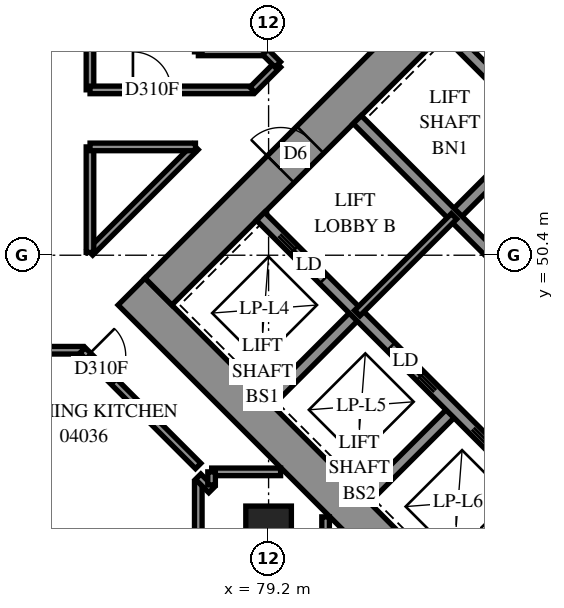
"""IFC4 building model, lengths in metres.
Left out: names, types, materials, properties, quantities, classifications, styles, units other than length and angle.
Written with IfcOpenShell. Run it as: python <this file> out.ifc"""

import sys

from ifc_helpers import new_model, si_unit, direction, frame, frame_2d, origin, origin_2d, place, context, subcontext, project, spatial, polyline, rectangle, outline, extrude, element, fill, save


model = new_model("IFC4")
c1 = context("Model", 3, precision=1e-05, world=origin(), true_north=direction((0.0, 1.0)))
c2 = subcontext(c1, "Body", "Model", "MODEL_VIEW")
j1 = project(units=[si_unit("LENGTHUNIT", "METRE"), si_unit("PLANEANGLEUNIT", "RADIAN")], contexts=[c1])
p1 = place(None, origin())
s1 = spatial("IfcSite", under=j1, at=p1, CompositionType="ELEMENT")
p2 = place(p1, origin())
s2 = spatial("IfcBuilding", under=s1, at=p2, CompositionType="ELEMENT")
p3 = place(p2, frame((0.0, 0.0, 18.6)))
s3 = spatial("IfcBuildingStorey", under=s2, at=p3, CompositionType="ELEMENT", Elevation=18.6)
p4 = place(p3, frame((79.2, 43.2, 0.0), z_axis=(0.0, 0.0, 1.0), x_axis=(1.0, 0.0, 0.0)))
e1 = element("IfcColumn", 1, at=p4, inside=s3, PredefinedType="COLUMN", context=c2, shape_type="SweptSolid", body=[
    extrude(rectangle(XDim=1.2, YDim=1.2, at=origin_2d()), origin(), (0.0, 0.0, 1.0), 3.8),
])
p5 = place(p3, frame((75.594, 49.443, -0.4), z_axis=(0.0, 0.0, 1.0), x_axis=(0.7071037324, -0.70710983, 0.0)))
e2 = element("IfcWall", 2, at=p5, inside=s3, PredefinedType="SHEAR", context=c2, shape_type="SweptSolid", body=[
    extrude(rectangle(XDim=16.4, YDim=1.0, at=frame_2d((8.2, 0.0))), origin(), (0.0, 0.0, 1.0), 3.5),
])
p6 = place(p3, frame((76.301, 49.443, -0.4), z_axis=(0.0, 0.0, 1.0), x_axis=(0.7071067812, 0.7071067812, 0.0)))
e3 = element("IfcWall", 3, at=p6, inside=s3, PredefinedType="SHEAR", context=c2, shape_type="SweptSolid", body=[
    extrude(rectangle(XDim=14.4, YDim=1.0, at=frame_2d((7.2, 0.0))), origin(), (0.0, 0.0, 1.0), 3.5),
])
p7 = place(p6, frame((4.55, 0.0, 0.4)))
e4 = element("IfcOpeningElement", 4, at=p7, cuts=e3, PredefinedType="OPENING", context=c2, shape_type="SweptSolid", body=[
    extrude(rectangle(XDim=1.1, YDim=2.1, at=frame_2d((0.55, 1.05))), frame((0.0, 0.51, 0.0), z_axis=(0.0, -1.0, 0.0), x_axis=(1.0, 0.0, 0.0)), (0.0, 0.0, 1.0), 1.02),
])
p8 = place(p6, frame((11.35, 0.0, 0.4)))
e5 = element("IfcOpeningElement", 5, at=p8, cuts=e3, PredefinedType="OPENING", context=c2, shape_type="SweptSolid", body=[
    extrude(rectangle(XDim=1.1, YDim=2.1, at=frame_2d((0.55, 1.05))), frame((0.0, 0.51, 0.0), z_axis=(0.0, -1.0, 0.0), x_axis=(1.0, 0.0, 0.0)), (0.0, 0.0, 1.0), 1.02),
])
for number, where, z_axis, x_axis in (
    (6, (79.2, 46.544, 0.0), (0.0, 0.0, 1.0), (0.707, 0.707, 0.0)),
    (7, (84.079, 51.423, 0.0), (0.0, 0.0, 1.0), (0.707, 0.707, 0.0)),
):
    element("IfcWall", number, at=place(p3, frame(where, z_axis=z_axis, x_axis=x_axis)), inside=s3, PredefinedType="SOLIDWALL", context=c2, shape_type="SweptSolid", body=[
        extrude(rectangle(XDim=3.3, YDim=0.3, at=frame_2d((1.65, 0.0))), origin(), (0.0, 0.0, 1.0), 3.8),
    ])
for number, where, z_axis, x_axis in (
    (8, (81.746, 43.999, 0.0), (0.0, 0.0, 1.0), (0.707, 0.707, 0.0)),
    (9, (84.291, 41.453, 0.0), (0.0, 0.0, 1.0), (0.707, 0.707, 0.0)),
):
    element("IfcWall", number, at=place(p3, frame(where, z_axis=z_axis, x_axis=x_axis)), inside=s3, PredefinedType="SOLIDWALL", context=c2, shape_type="SweptSolid", body=[
        extrude(rectangle(XDim=3.3, YDim=0.3, at=frame_2d((1.65, 0.0))), origin(), (0.0, 0.0, 1.0), 3.8),
    ])
p9 = place(p3, frame((78.988, 51.423, 0.0), z_axis=(0.0, 0.0, 1.0), x_axis=(0.7071067812, -0.7071067812, 0.0)))
e10 = element("IfcWall", 10, at=p9, inside=s3, PredefinedType="SOLIDWALL", context=c2, shape_type="SweptSolid", body=[
    extrude(rectangle(XDim=14.4, YDim=0.3, at=frame_2d((7.2, 0.0))), origin(), (0.0, 0.0, 1.0), 3.8),
])
p10 = place(p9, frame((1.25, 0.0, 0.0)))
e11 = element("IfcOpeningElement", 11, at=p10, cuts=e10, PredefinedType="OPENING", context=c2, shape_type="SweptSolid", body=[
    extrude(rectangle(XDim=1.1, YDim=2.1, at=frame_2d((0.55, 1.05))), frame((0.0, 0.16, 0.0), z_axis=(0.0, -1.0, 0.0), x_axis=(1.0, 0.0, 0.0)), (0.0, 0.0, 1.0), 0.32),
])
p11 = place(p9, frame((4.85, 0.0, 0.0)))
e12 = element("IfcOpeningElement", 12, at=p11, cuts=e10, PredefinedType="OPENING", context=c2, shape_type="SweptSolid", body=[
    extrude(rectangle(XDim=1.1, YDim=2.1, at=frame_2d((0.55, 1.05))), frame((0.0, 0.16, 0.0), z_axis=(0.0, -1.0, 0.0), x_axis=(1.0, 0.0, 0.0)), (0.0, 0.0, 1.0), 0.32),
])
p12 = place(p9, frame((8.45, 0.0, 0.0)))
e13 = element("IfcOpeningElement", 13, at=p12, cuts=e10, PredefinedType="OPENING", context=c2, shape_type="SweptSolid", body=[
    extrude(rectangle(XDim=1.1, YDim=2.1, at=frame_2d((0.55, 1.05))), frame((0.0, 0.16, 0.0), z_axis=(0.0, -1.0, 0.0), x_axis=(1.0, 0.0, 0.0)), (0.0, 0.0, 1.0), 0.32),
])
p13 = place(p9, frame((12.05, 0.0, 0.0)))
e14 = element("IfcOpeningElement", 14, at=p13, cuts=e10, PredefinedType="OPENING", context=c2, shape_type="SweptSolid", body=[
    extrude(rectangle(XDim=1.1, YDim=2.1, at=frame_2d((0.55, 1.05))), frame((0.0, 0.16, 0.0), z_axis=(0.0, -1.0, 0.0), x_axis=(1.0, 0.0, 0.0)), (0.0, 0.0, 1.0), 0.32),
])
p14 = place(p3, frame((81.534, 53.969, 0.0), z_axis=(0.0, 0.0, 1.0), x_axis=(0.707103309, -0.7071102534, 0.0)))
e15 = element("IfcWall", 15, at=p14, inside=s3, PredefinedType="SOLIDWALL", context=c2, shape_type="SweptSolid", body=[
    extrude(rectangle(XDim=14.4, YDim=0.3, at=frame_2d((7.2, 0.0))), origin(), (0.0, 0.0, 1.0), 3.8),
])
p15 = place(p14, frame((12.05, 0.0, 0.0)))
e16 = element("IfcOpeningElement", 16, at=p15, cuts=e15, PredefinedType="OPENING", context=c2, shape_type="SweptSolid", body=[
    extrude(rectangle(XDim=1.1, YDim=2.1, at=frame_2d((0.55, 1.05))), frame((0.0, 0.16, 0.0), z_axis=(0.0, -1.0, 0.0), x_axis=(1.0, 0.0, 0.0)), (0.0, 0.0, 1.0), 0.32),
])
p16 = place(p3, frame((83.867, 56.302, 0.0), z_axis=(0.0, 0.0, 1.0), x_axis=(0.7071137256, -0.7070998367, 0.0)))
e17 = element("IfcWall", 17, at=p16, inside=s3, PredefinedType="SOLIDWALL", context=c2, shape_type="SweptSolid", body=[
    extrude(rectangle(XDim=7.2, YDim=0.3, at=frame_2d((3.6, 0.0))), origin(), (0.0, 0.0, 1.0), 3.8),
])
p17 = place(p3, frame((117.843, 34.665, 0.0), z_axis=(0.0, 0.0, 1.0), x_axis=(-0.7071067812, 0.7071067812, 0.0)))
e18 = element("IfcWall", 18, at=p17, inside=s3, PredefinedType="SOLIDWALL", context=c2, shape_type="SweptSolid", body=[
    extrude(outline(polyline([(-0.275, -0.275), (54.222, -0.275), (53.994, 0.275), (0.275, 0.275), (-0.275, -0.275)])), origin(), (0.0, 0.0, 1.0), 3.8),
])
p18 = place(p17, frame((0.8, 0.0, 0.7)))
e19 = element("IfcOpeningElement", 19, at=p18, cuts=e18, PredefinedType="OPENING", context=c2, shape_type="SweptSolid", body=[
    extrude(rectangle(XDim=1.8, YDim=2.4, at=frame_2d((0.9, 1.2))), frame((0.0, 0.285, 0.0), z_axis=(0.0, -1.0, 0.0), x_axis=(1.0, 0.0, 0.0)), (0.0, 0.0, 1.0), 0.57),
])
p19 = place(p17, frame((4.225, 0.0, 0.7)))
e20 = element("IfcOpeningElement", 20, at=p19, cuts=e18, PredefinedType="OPENING", context=c2, shape_type="SweptSolid", body=[
    extrude(rectangle(XDim=1.8, YDim=2.4, at=frame_2d((0.9, 1.2))), frame((0.0, 0.285, 0.0), z_axis=(0.0, -1.0, 0.0), x_axis=(1.0, 0.0, 0.0)), (0.0, 0.0, 1.0), 0.57),
])
p20 = place(p17, frame((7.825, 0.0, 0.7)))
e21 = element("IfcOpeningElement", 21, at=p20, cuts=e18, PredefinedType="OPENING", context=c2, shape_type="SweptSolid", body=[
    extrude(rectangle(XDim=1.8, YDim=2.4, at=frame_2d((0.9, 1.2))), frame((0.0, 0.285, 0.0), z_axis=(0.0, -1.0, 0.0), x_axis=(1.0, 0.0, 0.0)), (0.0, 0.0, 1.0), 0.57),
])
p21 = place(p17, frame((11.425, 0.0, 0.7)))
e22 = element("IfcOpeningElement", 22, at=p21, cuts=e18, PredefinedType="OPENING", context=c2, shape_type="SweptSolid", body=[
    extrude(rectangle(XDim=1.8, YDim=2.4, at=frame_2d((0.9, 1.2))), frame((0.0, 0.285, 0.0), z_axis=(0.0, -1.0, 0.0), x_axis=(1.0, 0.0, 0.0)), (0.0, 0.0, 1.0), 0.57),
])
p22 = place(p17, frame((15.025, 0.0, 0.7)))
e23 = element("IfcOpeningElement", 23, at=p22, cuts=e18, PredefinedType="OPENING", context=c2, shape_type="SweptSolid", body=[
    extrude(rectangle(XDim=1.8, YDim=2.4, at=frame_2d((0.9, 1.2))), frame((0.0, 0.285, 0.0), z_axis=(0.0, -1.0, 0.0), x_axis=(1.0, 0.0, 0.0)), (0.0, 0.0, 1.0), 0.57),
])
p23 = place(p17, frame((18.625, 0.0, 0.7)))
e24 = element("IfcOpeningElement", 24, at=p23, cuts=e18, PredefinedType="OPENING", context=c2, shape_type="SweptSolid", body=[
    extrude(rectangle(XDim=1.8, YDim=2.4, at=frame_2d((0.9, 1.2))), frame((0.0, 0.285, 0.0), z_axis=(0.0, -1.0, 0.0), x_axis=(1.0, 0.0, 0.0)), (0.0, 0.0, 1.0), 0.57),
])
p24 = place(p17, frame((22.225, 0.0, 0.7)))
e25 = element("IfcOpeningElement", 25, at=p24, cuts=e18, PredefinedType="OPENING", context=c2, shape_type="SweptSolid", body=[
    extrude(rectangle(XDim=1.8, YDim=2.4, at=frame_2d((0.9, 1.2))), frame((0.0, 0.285, 0.0), z_axis=(0.0, -1.0, 0.0), x_axis=(1.0, 0.0, 0.0)), (0.0, 0.0, 1.0), 0.57),
])
p25 = place(p17, frame((25.825, 0.0, 0.7)))
e26 = element("IfcOpeningElement", 26, at=p25, cuts=e18, PredefinedType="OPENING", context=c2, shape_type="SweptSolid", body=[
    extrude(rectangle(XDim=1.8, YDim=2.4, at=frame_2d((0.9, 1.2))), frame((0.0, 0.285, 0.0), z_axis=(0.0, -1.0, 0.0), x_axis=(1.0, 0.0, 0.0)), (0.0, 0.0, 1.0), 0.57),
])
p26 = place(p17, frame((29.425, 0.0, 0.7)))
e27 = element("IfcOpeningElement", 27, at=p26, cuts=e18, PredefinedType="OPENING", context=c2, shape_type="SweptSolid", body=[
    extrude(rectangle(XDim=1.8, YDim=2.4, at=frame_2d((0.9, 1.2))), frame((0.0, 0.285, 0.0), z_axis=(0.0, -1.0, 0.0), x_axis=(1.0, 0.0, 0.0)), (0.0, 0.0, 1.0), 0.57),
])
p27 = place(p17, frame((33.025, 0.0, 0.7)))
e28 = element("IfcOpeningElement", 28, at=p27, cuts=e18, PredefinedType="OPENING", context=c2, shape_type="SweptSolid", body=[
    extrude(rectangle(XDim=1.8, YDim=2.4, at=frame_2d((0.9, 1.2))), frame((0.0, 0.285, 0.0), z_axis=(0.0, -1.0, 0.0), x_axis=(1.0, 0.0, 0.0)), (0.0, 0.0, 1.0), 0.57),
])
p28 = place(p17, frame((36.625, 0.0, 0.7)))
e29 = element("IfcOpeningElement", 29, at=p28, cuts=e18, PredefinedType="OPENING", context=c2, shape_type="SweptSolid", body=[
    extrude(rectangle(XDim=1.8, YDim=2.4, at=frame_2d((0.9, 1.2))), frame((0.0, 0.285, 0.0), z_axis=(0.0, -1.0, 0.0), x_axis=(1.0, 0.0, 0.0)), (0.0, 0.0, 1.0), 0.57),
])
p29 = place(p17, frame((40.225, 0.0, 0.7)))
e30 = element("IfcOpeningElement", 30, at=p29, cuts=e18, PredefinedType="OPENING", context=c2, shape_type="SweptSolid", body=[
    extrude(rectangle(XDim=1.8, YDim=2.4, at=frame_2d((0.9, 1.2))), frame((0.0, 0.285, 0.0), z_axis=(0.0, -1.0, 0.0), x_axis=(1.0, 0.0, 0.0)), (0.0, 0.0, 1.0), 0.57),
])
p30 = place(p17, frame((43.825, 0.0, 0.7)))
e31 = element("IfcOpeningElement", 31, at=p30, cuts=e18, PredefinedType="OPENING", context=c2, shape_type="SweptSolid", body=[
    extrude(rectangle(XDim=1.8, YDim=2.4, at=frame_2d((0.9, 1.2))), frame((0.0, 0.285, 0.0), z_axis=(0.0, -1.0, 0.0), x_axis=(1.0, 0.0, 0.0)), (0.0, 0.0, 1.0), 0.57),
])
p31 = place(p17, frame((47.425, 0.0, 0.7)))
e32 = element("IfcOpeningElement", 32, at=p31, cuts=e18, PredefinedType="OPENING", context=c2, shape_type="SweptSolid", body=[
    extrude(rectangle(XDim=1.8, YDim=2.4, at=frame_2d((0.9, 1.2))), frame((0.0, 0.285, 0.0), z_axis=(0.0, -1.0, 0.0), x_axis=(1.0, 0.0, 0.0)), (0.0, 0.0, 1.0), 0.57),
])
p32 = place(p17, frame((51.06, 0.0, 0.7)))
e33 = element("IfcOpeningElement", 33, at=p32, cuts=e18, PredefinedType="OPENING", context=c2, shape_type="SweptSolid", body=[
    extrude(rectangle(XDim=1.8, YDim=2.4, at=frame_2d((0.9, 1.2))), frame((0.0, 0.285, 0.0), z_axis=(0.0, -1.0, 0.0), x_axis=(1.0, 0.0, 0.0)), (0.0, 0.0, 1.0), 0.57),
])
p33 = place(p3, frame((81.534, 48.878, 0.0), z_axis=(0.0, 0.0, 1.0), x_axis=(0.707092892, 0.7071206701, 0.0)))
e34 = element("IfcWall", 34, at=p33, inside=s3, PredefinedType="PARTITIONING", context=c2, shape_type="SweptSolid", body=[
    extrude(rectangle(XDim=3.6, YDim=0.2, at=frame_2d((1.8, 0.0))), origin(), (0.0, 0.0, 1.0), 3.8),
])
p34 = place(p3, frame((55.1, 47.9, 0.0), z_axis=(0.0, 0.0, 1.0), x_axis=(1.0, 0.0, 0.0)))
e35 = element("IfcWall", 35, at=p34, inside=s3, PredefinedType="PARTITIONING", context=c2, shape_type="SweptSolid", body=[
    extrude(rectangle(XDim=19.208, YDim=0.2, at=frame_2d((9.604, 0.0))), origin(), (0.0, 0.0, 1.0), 3.8),
])
p35 = place(p34, frame((6.058, 0.0, 0.0)))
e36 = element("IfcOpeningElement", 36, at=p35, cuts=e35, PredefinedType="OPENING", context=c2, shape_type="SweptSolid", body=[
    extrude(rectangle(XDim=1.0, YDim=2.1, at=frame_2d((0.5, 1.05))), frame((0.0, 0.11, 0.0), z_axis=(0.0, -1.0, 0.0), x_axis=(1.0, 0.0, 0.0)), (0.0, 0.0, 1.0), 0.22),
])
p36 = place(p34, frame((13.258, 0.0, 0.0)))
e37 = element("IfcOpeningElement", 37, at=p36, cuts=e35, PredefinedType="OPENING", context=c2, shape_type="SweptSolid", body=[
    extrude(rectangle(XDim=1.0, YDim=2.1, at=frame_2d((0.5, 1.05))), frame((0.0, 0.11, 0.0), z_axis=(0.0, -1.0, 0.0), x_axis=(1.0, 0.0, 0.0)), (0.0, 0.0, 1.0), 0.22),
])
p37 = place(p3, frame((74.5, 54.752, 0.0), z_axis=(0.0, 0.0, 1.0), x_axis=(0.0, 1.0, 0.0)))
e38 = element("IfcWall", 38, at=p37, inside=s3, PredefinedType="PARTITIONING", context=c2, shape_type="SweptSolid", body=[
    extrude(rectangle(XDim=5.612, YDim=0.2, at=frame_2d((2.806, 0.0))), origin(), (0.0, 0.0, 1.0), 3.8),
])
p38 = place(p3, frame((74.305, 47.897, 0.0), z_axis=(0.0, 0.0, 1.0), x_axis=(0.7071067812, -0.7071067812, 0.0)))
e39 = element("IfcWall", 39, at=p38, inside=s3, PredefinedType="PARTITIONING", context=c2, shape_type="SweptSolid", body=[
    extrude(rectangle(XDim=4.302, YDim=0.2, at=frame_2d((2.151, 0.0))), origin(), (0.0, 0.0, 1.0), 3.8),
])
p39 = place(p38, frame((0.192, 0.0, 0.0)))
e40 = element("IfcOpeningElement", 40, at=p39, cuts=e39, PredefinedType="OPENING", context=c2, shape_type="SweptSolid", body=[
    extrude(rectangle(XDim=1.0, YDim=2.1, at=frame_2d((0.5, 1.05))), frame((0.0, 0.11, 0.0), z_axis=(0.0, -1.0, 0.0), x_axis=(1.0, 0.0, 0.0)), (0.0, 0.0, 1.0), 0.22),
])
p40 = place(p3, frame((74.502, 54.75, 0.0), z_axis=(0.0, 0.0, 1.0), x_axis=(1.0, 0.0, 0.0)))
e41 = element("IfcWall", 41, at=p40, inside=s3, PredefinedType="PARTITIONING", context=c2, shape_type="SweptSolid", body=[
    extrude(rectangle(XDim=4.276, YDim=0.2, at=frame_2d((2.138, 0.0))), origin(), (0.0, 0.0, 1.0), 3.8),
])
p41 = place(p40, frame((1.129, 0.0, 0.0)))
e42 = element("IfcOpeningElement", 42, at=p41, cuts=e41, PredefinedType="OPENING", context=c2, shape_type="SweptSolid", body=[
    extrude(rectangle(XDim=1.0, YDim=2.1, at=frame_2d((0.5, 1.05))), frame((0.0, 0.11, 0.0), z_axis=(0.0, -1.0, 0.0), x_axis=(1.0, 0.0, 0.0)), (0.0, 0.0, 1.0), 0.22),
])
p42 = place(p3, frame((74.501, 50.473, 0.0), z_axis=(0.0, 0.0, 1.0), x_axis=(0.7071067812, 0.7071067812, 0.0)))
e43 = element("IfcWall", 43, at=p42, inside=s3, PredefinedType="PARTITIONING", context=c2, shape_type="SweptSolid", body=[
    extrude(rectangle(XDim=3.926, YDim=0.2, at=frame_2d((1.963, 0.0))), origin(), (0.0, 0.0, 1.0), 3.8),
])
p43 = place(p3, frame((74.5, 50.474, 0.0), z_axis=(0.0, 0.0, 1.0), x_axis=(0.0, 1.0, 0.0)))
e44 = element("IfcWall", 44, at=p43, inside=s3, PredefinedType="PARTITIONING", context=c2, shape_type="SweptSolid", body=[
    extrude(rectangle(XDim=2.776, YDim=0.2, at=frame_2d((1.388, 0.0))), origin(), (0.0, 0.0, 1.0), 3.8),
])
p44 = place(p3, frame((74.502, 53.25, 0.0), z_axis=(0.0, 0.0, 1.0), x_axis=(1.0, 0.0, 0.0)))
e45 = element("IfcWall", 45, at=p44, inside=s3, PredefinedType="PARTITIONING", context=c2, shape_type="SweptSolid", body=[
    extrude(rectangle(XDim=2.774, YDim=0.2, at=frame_2d((1.387, 0.0))), origin(), (0.0, 0.0, 1.0), 3.8),
])
p45 = place(p3, frame((77.35, 42.384, 0.0), z_axis=(0.0, 0.0, 1.0), x_axis=(0.0, 1.0, 0.0)))
e46 = element("IfcWall", 46, at=p45, inside=s3, PredefinedType="PARTITIONING", context=c2, shape_type="SweptSolid", body=[
    extrude(rectangle(XDim=2.052, YDim=0.2, at=frame_2d((1.026, 0.0))), origin(), (0.0, 0.0, 1.0), 3.8),
])
for number, where, z_axis, x_axis in (
    (47, (77.702, 44.7, 0.0), (0.0, 0.0, 1.0), (1.0, 0.0, 0.0)),
    (48, (80.7, 41.702, 0.0), (0.0, 0.0, 1.0), (0.0, 1.0, 0.0)),
):
    element("IfcWall", number, at=place(p3, frame(where, z_axis=z_axis, x_axis=x_axis)), inside=s3, PredefinedType="PARTITIONING", context=c2, shape_type="SweptSolid", body=[
        extrude(rectangle(XDim=1.814, YDim=0.2, at=frame_2d((0.907, 0.0))), origin(), (0.0, 0.0, 1.0), 3.8),
    ])
p46 = place(p3, frame((77.352, 55.75, 0.0), z_axis=(0.0, 0.0, 1.0), x_axis=(1.0, 0.0, 0.0)))
e49 = element("IfcWall", 49, at=p46, inside=s3, PredefinedType="PARTITIONING", context=c2, shape_type="SweptSolid", body=[
    extrude(rectangle(XDim=1.764, YDim=0.2, at=frame_2d((0.882, 0.0))), origin(), (0.0, 0.0, 1.0), 3.8),
])
p47 = place(p3, frame((78.779, 54.751, 0.0), z_axis=(0.0, 0.0, 1.0), x_axis=(0.7071067812, 0.7071067812, 0.0)))
e50 = element("IfcWall", 50, at=p47, inside=s3, PredefinedType="PARTITIONING", context=c2, shape_type="SweptSolid", body=[
    extrude(rectangle(XDim=0.945, YDim=0.2, at=frame_2d((0.472, 0.0))), origin(), (0.0, 0.0, 1.0), 3.8),
])
p48 = place(p3, frame((77.347, 44.573, 0.0), z_axis=(0.0, 0.0, 1.0), x_axis=(0.7071067812, -0.7071067812, 0.0)))
e51 = element("IfcWall", 51, at=p48, inside=s3, PredefinedType="PARTITIONING", context=c2, shape_type="SweptSolid", body=[
    extrude(rectangle(XDim=0.495, YDim=0.2, at=frame_2d((0.247, 0.0))), origin(), (0.0, 0.0, 1.0), 3.8),
])
p49 = place(p3, frame((77.7, 44.356, 0.0), z_axis=(0.0, 0.0, 1.0), x_axis=(0.0, 1.0, 0.0)))
e52 = element("IfcWall", 52, at=p49, inside=s3, PredefinedType="PARTITIONING", context=c2, shape_type="SweptSolid", body=[
    extrude(rectangle(XDim=0.344, YDim=0.2, at=frame_2d((0.172, 0.0))), origin(), (0.0, 0.0, 1.0), 3.8),
])
p50 = place(p3, frame((79.113, 55.747, 0.0), z_axis=(0.0, 0.0, 1.0), x_axis=(0.7071067812, -0.7071067812, 0.0)))
e53 = element("IfcWall", 53, at=p50, inside=s3, PredefinedType="PARTITIONING", context=c2, shape_type="SweptSolid", body=[
    extrude(rectangle(XDim=0.467, YDim=0.2, at=frame_2d((0.233, 0.0))), origin(), (0.0, 0.0, 1.0), 3.8),
])
p51 = place(p7, origin())
e54 = element("IfcDoor", 54, at=p51, inside=s3, OperationType="DOUBLE_DOOR_SINGLE_SWING", PredefinedType="DOOR", context=c2, shape_type="SweptSolid", body=[
    extrude(rectangle(XDim=1.1, YDim=2.1, at=frame_2d((0.55, 1.05))), frame((0.0, 0.025, 0.0), z_axis=(0.0, -1.0, 0.0), x_axis=(1.0, 0.0, 0.0)), (0.0, 0.0, 1.0), 0.05),
])
fill(e4, e54)
p52 = place(p10, origin())
e55 = element("IfcDoor", 55, at=p52, inside=s3, OperationType="SLIDING_TO_LEFT", PredefinedType="DOOR", context=c2, shape_type="SweptSolid", body=[
    extrude(rectangle(XDim=1.1, YDim=2.1, at=frame_2d((0.55, 1.05))), frame((0.0, 0.025, 0.0), z_axis=(0.0, -1.0, 0.0), x_axis=(1.0, 0.0, 0.0)), (0.0, 0.0, 1.0), 0.05),
])
fill(e11, e55)
p53 = place(p11, origin())
e56 = element("IfcDoor", 56, at=p53, inside=s3, OperationType="SLIDING_TO_RIGHT", PredefinedType="DOOR", context=c2, shape_type="SweptSolid", body=[
    extrude(rectangle(XDim=1.1, YDim=2.1, at=frame_2d((0.55, 1.05))), frame((0.0, 0.025, 0.0), z_axis=(0.0, -1.0, 0.0), x_axis=(1.0, 0.0, 0.0)), (0.0, 0.0, 1.0), 0.05),
])
fill(e12, e56)
p54 = place(p39, origin())
e57 = element("IfcDoor", 57, at=p54, inside=s3, OperationType="SINGLE_SWING_LEFT", PredefinedType="DOOR", context=c2, shape_type="SweptSolid", body=[
    extrude(rectangle(XDim=1.0, YDim=2.1, at=frame_2d((0.5, 1.05))), frame((0.0, 0.025, 0.0), z_axis=(0.0, -1.0, 0.0), x_axis=(1.0, 0.0, 0.0)), (0.0, 0.0, 1.0), 0.05),
])
fill(e40, e57)
p55 = place(p41, origin())
e58 = element("IfcDoor", 58, at=p55, inside=s3, OperationType="SINGLE_SWING_LEFT", PredefinedType="DOOR", context=c2, shape_type="SweptSolid", body=[
    extrude(rectangle(XDim=1.0, YDim=2.1, at=frame_2d((0.5, 1.05))), frame((0.0, 0.025, 0.0), z_axis=(0.0, -1.0, 0.0), x_axis=(1.0, 0.0, 0.0)), (0.0, 0.0, 1.0), 0.05),
])
fill(e42, e58)
save(model, sys.argv[1])
